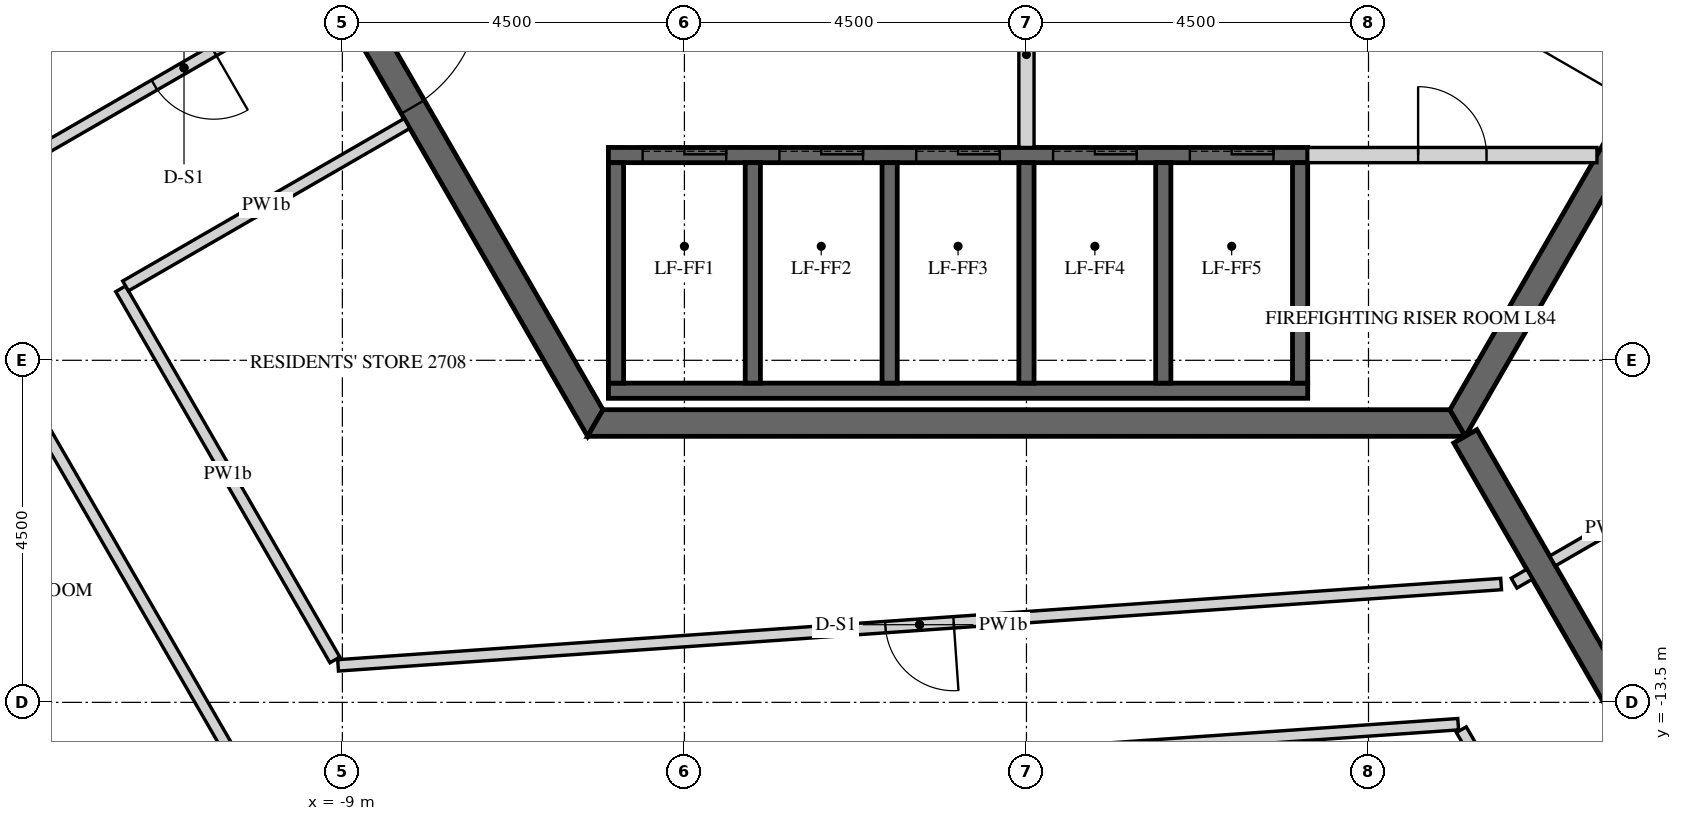
"""IFC4 building model, lengths in metres.
Left out: names, types, materials, properties, quantities, classifications, styles, units other than length and angle.
Written with IfcOpenShell. Run it as: python <this file> out.ifc"""

import sys

from ifc_helpers import new_model, si_unit, direction, frame, frame_2d, origin, place, context, subcontext, project, spatial, polyline, rectangle, outline, extrude, element, fill, save


model = new_model("IFC4")
c1 = context("Model", 3, precision=1e-05, world=origin(), true_north=direction((0.0, 1.0)))
c2 = subcontext(c1, "Body", "Model", "MODEL_VIEW")
j1 = project(units=[si_unit("LENGTHUNIT", "METRE"), si_unit("PLANEANGLEUNIT", "RADIAN")], contexts=[c1])
p1 = place(None, origin())
s1 = spatial("IfcSite", under=j1, at=p1, CompositionType="ELEMENT")
p2 = place(p1, origin())
s2 = spatial("IfcBuilding", under=s1, at=p2, CompositionType="ELEMENT")
p3 = place(p2, frame((0.0, 0.0, 349.5)))
s3 = spatial("IfcBuildingStorey", under=s2, at=p3, CompositionType="ELEMENT", Elevation=349.5)
p4 = place(p3, frame((-11.345, 0.0, 0.0), z_axis=(0.0, 0.0, 1.0), x_axis=(0.499995046907, -0.866028263435, 0.0)))
e1 = element("IfcWall", 1, at=p4, inside=s3, PredefinedType="SHEAR", context=c2, shape_type="SweptSolid", body=[
    extrude(outline(polyline([(-0.101, -0.175), (11.446, -0.175), (11.244, 0.175), (0.101, 0.175), (-0.101, -0.175)])), origin(), (0.0, 0.0, 1.0), 3.75),
])
p5 = place(p4, frame((4.744, 0.0, 0.0)))
e2 = element("IfcOpeningElement", 2, at=p5, cuts=e1, PredefinedType="OPENING", context=c2, shape_type="SweptSolid", body=[
    extrude(rectangle(XDim=1.8, YDim=2.4, at=frame_2d((0.9, 1.2))), frame((0.0, 0.185, 0.0), z_axis=(0.0, -1.0, 0.0), x_axis=(1.0, 0.0, 0.0)), (0.0, 0.0, 1.0), 0.37),
])
p6 = place(p3, frame((-5.673, -9.825, 0.0), z_axis=(0.0, 0.0, 1.0), x_axis=(1.0, 0.0, 0.0)))
e3 = element("IfcWall", 3, at=p6, inside=s3, PredefinedType="SHEAR", context=c2, shape_type="SweptSolid", body=[
    extrude(outline(polyline([(-0.101, -0.175), (11.446, -0.175), (11.244, 0.175), (0.101, 0.175), (-0.101, -0.175)])), origin(), (0.0, 0.0, 1.0), 3.75),
])
p7 = place(p3, frame((5.673, -9.825, 0.0), z_axis=(0.0, 0.0, 1.0), x_axis=(0.499995046907, 0.866028263435, 0.0)))
e4 = element("IfcWall", 4, at=p7, inside=s3, PredefinedType="SHEAR", context=c2, shape_type="SweptSolid", body=[
    extrude(outline(polyline([(-0.101, -0.175), (11.446, -0.175), (11.244, 0.175), (0.101, 0.175), (-0.101, -0.175)])), origin(), (0.0, 0.0, 1.0), 3.75),
])
p8 = place(p7, frame((4.801, 0.0, 0.0)))
e5 = element("IfcOpeningElement", 5, at=p8, cuts=e4, PredefinedType="OPENING", context=c2, shape_type="SweptSolid", body=[
    extrude(rectangle(XDim=1.8, YDim=2.4, at=frame_2d((0.9, 1.2))), frame((0.0, 0.185, 0.0), z_axis=(0.0, -1.0, 0.0), x_axis=(1.0, 0.0, 0.0)), (0.0, 0.0, 1.0), 0.37),
])
p9 = place(p3, frame((5.773, -10.0, 0.0), z_axis=(0.0, 0.0, 1.0), x_axis=(0.500007911273, -0.866020836161, 0.0)))
e6 = element("IfcWall", 6, at=p9, inside=s3, PredefinedType="SHEAR", context=c2, shape_type="SweptSolid", body=[
    extrude(rectangle(XDim=14.51, YDim=0.35, at=frame_2d((7.255, 0.0))), origin(), (0.0, 0.0, 1.0), 3.75),
])
p10 = place(p9, frame((6.355, 0.0, 0.0)))
e7 = element("IfcOpeningElement", 7, at=p10, cuts=e6, PredefinedType="OPENING", context=c2, shape_type="SweptSolid", body=[
    extrude(rectangle(XDim=1.8, YDim=2.4, at=frame_2d((0.9, 1.2))), frame((0.0, 0.185, 0.0), z_axis=(0.0, -1.0, 0.0), x_axis=(1.0, 0.0, 0.0)), (0.0, 0.0, 1.0), 0.37),
])
p11 = place(p3, frame((-5.5, -6.3, -0.5), z_axis=(0.0, 0.0, 1.0), x_axis=(1.0, 0.0, 0.0)))
e8 = element("IfcWall", 8, at=p11, inside=s3, PredefinedType="SHEAR", context=c2, shape_type="SweptSolid", body=[
    extrude(rectangle(XDim=9.2, YDim=0.2, at=frame_2d((4.6, 0.0))), origin(), (0.0, 0.0, 1.0), 4.15),
])
p12 = place(p11, frame((0.45, 0.0, 0.5)))
e9 = element("IfcOpeningElement", 9, at=p12, cuts=e8, PredefinedType="OPENING", context=c2, shape_type="SweptSolid", body=[
    extrude(rectangle(XDim=1.1, YDim=2.1, at=frame_2d((0.55, 1.05))), frame((0.0, 0.11, 0.0), z_axis=(0.0, -1.0, 0.0), x_axis=(1.0, 0.0, 0.0)), (0.0, 0.0, 1.0), 0.22),
])
p13 = place(p11, frame((2.25, 0.0, 0.5)))
e10 = element("IfcOpeningElement", 10, at=p13, cuts=e8, PredefinedType="OPENING", context=c2, shape_type="SweptSolid", body=[
    extrude(rectangle(XDim=1.1, YDim=2.1, at=frame_2d((0.55, 1.05))), frame((0.0, 0.11, 0.0), z_axis=(0.0, -1.0, 0.0), x_axis=(1.0, 0.0, 0.0)), (0.0, 0.0, 1.0), 0.22),
])
p14 = place(p11, frame((4.05, 0.0, 0.5)))
e11 = element("IfcOpeningElement", 11, at=p14, cuts=e8, PredefinedType="OPENING", context=c2, shape_type="SweptSolid", body=[
    extrude(rectangle(XDim=1.1, YDim=2.1, at=frame_2d((0.55, 1.05))), frame((0.0, 0.11, 0.0), z_axis=(0.0, -1.0, 0.0), x_axis=(1.0, 0.0, 0.0)), (0.0, 0.0, 1.0), 0.22),
])
p15 = place(p11, frame((5.85, 0.0, 0.5)))
e12 = element("IfcOpeningElement", 12, at=p15, cuts=e8, PredefinedType="OPENING", context=c2, shape_type="SweptSolid", body=[
    extrude(rectangle(XDim=1.1, YDim=2.1, at=frame_2d((0.55, 1.05))), frame((0.0, 0.11, 0.0), z_axis=(0.0, -1.0, 0.0), x_axis=(1.0, 0.0, 0.0)), (0.0, 0.0, 1.0), 0.22),
])
p16 = place(p11, frame((7.65, 0.0, 0.5)))
e13 = element("IfcOpeningElement", 13, at=p16, cuts=e8, PredefinedType="OPENING", context=c2, shape_type="SweptSolid", body=[
    extrude(rectangle(XDim=1.1, YDim=2.1, at=frame_2d((0.55, 1.05))), frame((0.0, 0.11, 0.0), z_axis=(0.0, -1.0, 0.0), x_axis=(1.0, 0.0, 0.0)), (0.0, 0.0, 1.0), 0.22),
])
p17 = place(p3, frame((-5.5, -9.4, -0.5), z_axis=(0.0, 0.0, 1.0), x_axis=(1.0, 0.0, 0.0)))
e14 = element("IfcWall", 14, at=p17, inside=s3, PredefinedType="SHEAR", context=c2, shape_type="SweptSolid", body=[
    extrude(rectangle(XDim=9.2, YDim=0.2, at=frame_2d((4.6, 0.0))), origin(), (0.0, 0.0, 1.0), 4.15),
])
for number, where, z_axis, x_axis in (
    (15, (-5.4, -9.3, -0.5), (0.0, 0.0, 1.0), (0.0, 1.0, 0.0)),
    (16, (-3.6, -9.3, -0.5), (0.0, 0.0, 1.0), (0.0, 1.0, 0.0)),
    (17, (-1.8, -9.3, -0.5), (0.0, 0.0, 1.0), (0.0, 1.0, 0.0)),
    (18, (0.0, -9.3, -0.5), (0.0, 0.0, 1.0), (0.0, 1.0, 0.0)),
    (19, (1.8, -9.3, -0.5), (0.0, 0.0, 1.0), (0.0, 1.0, 0.0)),
    (20, (3.6, -9.3, -0.5), (0.0, 0.0, 1.0), (0.0, 1.0, 0.0)),
):
    element("IfcWall", number, at=place(p3, frame(where, z_axis=z_axis, x_axis=x_axis)), inside=s3, PredefinedType="SHEAR", context=c2, shape_type="SweptSolid", body=[
        extrude(rectangle(XDim=2.9, YDim=0.2, at=frame_2d((1.45, 0.0))), origin(), (0.0, 0.0, 1.0), 4.15),
    ])
p18 = place(p3, frame((0.0, -6.2, 0.0), z_axis=(0.0, 0.0, 1.0), x_axis=(0.0, 1.0, 0.0)))
e21 = element("IfcWall", 21, at=p18, inside=s3, PredefinedType="PARTITIONING", context=c2, shape_type="SweptSolid", body=[
    extrude(rectangle(XDim=6.1, YDim=0.2, at=frame_2d((3.05, 0.0))), origin(), (0.0, 0.0, 1.0), 3.65),
])
p19 = place(p3, frame((3.7, -6.3, 0.0), z_axis=(0.0, 0.0, 1.0), x_axis=(1.0, 0.0, 0.0)))
e22 = element("IfcWall", 22, at=p19, inside=s3, PredefinedType="PARTITIONING", context=c2, shape_type="SweptSolid", body=[
    extrude(rectangle(XDim=3.806, YDim=0.2, at=frame_2d((1.903, 0.0))), origin(), (0.0, 0.0, 1.0), 3.65),
])
p20 = place(p19, frame((1.453, 0.0, 0.0)))
e23 = element("IfcOpeningElement", 23, at=p20, cuts=e22, PredefinedType="OPENING", context=c2, shape_type="SweptSolid", body=[
    extrude(rectangle(XDim=0.9, YDim=2.1, at=frame_2d((0.45, 1.05))), frame((0.0, 0.11, 0.0), z_axis=(0.0, -1.0, 0.0), x_axis=(1.0, 0.0, 0.0)), (0.0, 0.0, 1.0), 0.22),
])
p21 = place(p3, frame((-17.036, -2.792, 0.0), z_axis=(0.0, 0.0, 1.0), x_axis=(0.500006428338, -0.86602169235, 0.0)))
e24 = element("IfcWall", 24, at=p21, inside=s3, PredefinedType="PARTITIONING", context=c2, shape_type="SweptSolid", body=[
    extrude(rectangle(XDim=13.966, YDim=0.15, at=frame_2d((6.983, 0.0))), origin(), (0.0, 0.0, 1.0), 2.82),
])
p22 = place(p21, frame((3.325, 0.0, 0.0)))
e25 = element("IfcOpeningElement", 25, at=p22, cuts=e24, PredefinedType="OPENING", context=c2, shape_type="SweptSolid", body=[
    extrude(rectangle(XDim=1.0, YDim=2.1, at=frame_2d((0.5, 1.05))), frame((0.0, 0.085, 0.0), z_axis=(0.0, -1.0, 0.0), x_axis=(1.0, 0.0, 0.0)), (0.0, 0.0, 1.0), 0.17),
])
p23 = place(p3, frame((-9.97, -14.882, 0.0), z_axis=(0.0, 0.0, 1.0), x_axis=(0.997564384496, 0.06975169378, 0.0)))
e26 = element("IfcWall", 26, at=p23, inside=s3, PredefinedType="PARTITIONING", context=c2, shape_type="SweptSolid", body=[
    extrude(rectangle(XDim=15.688, YDim=0.15, at=frame_2d((7.844, 0.0))), origin(), (0.0, 0.0, 1.0), 2.82),
])
p24 = place(p3, frame((5.721, -13.86, 0.0), z_axis=(0.0, 0.0, 1.0), x_axis=(0.499970524249, -0.866042420948, 0.0)))
e27 = element("IfcWall", 27, at=p24, inside=s3, PredefinedType="PARTITIONING", context=c2, shape_type="SweptSolid", body=[
    extrude(rectangle(XDim=5.339, YDim=0.15, at=frame_2d((2.669, 0.0))), origin(), (0.0, 0.0, 1.0), 2.82),
])
p25 = place(p3, frame((-9.2, -4.066, 0.0), z_axis=(0.0, 0.0, 1.0), x_axis=(-0.866013608182, -0.500020430026, 0.0)))
e28 = element("IfcWall", 28, at=p25, inside=s3, PredefinedType="PARTITIONING", context=c2, shape_type="SweptSolid", body=[
    extrude(rectangle(XDim=4.35, YDim=0.15, at=frame_2d((2.175, 0.0))), origin(), (0.0, 0.0, 1.0), 2.82),
])
p26 = place(p25, frame((1.725, 0.0, 0.0)))
e29 = element("IfcOpeningElement", 29, at=p26, cuts=e28, PredefinedType="OPENING", context=c2, shape_type="SweptSolid", body=[
    extrude(rectangle(XDim=0.9, YDim=2.1, at=frame_2d((0.45, 1.05))), frame((0.0, 0.085, 0.0), z_axis=(0.0, -1.0, 0.0), x_axis=(1.0, 0.0, 0.0)), (0.0, 0.0, 1.0), 0.17),
])
p27 = place(p3, frame((6.619, -11.814, 0.0), z_axis=(0.0, 0.0, 1.0), x_axis=(-0.865544827262, -0.500831460673, 0.0)))
e30 = element("IfcWall", 30, at=p27, inside=s3, PredefinedType="PARTITIONING", context=c2, shape_type="SweptSolid", body=[
    extrude(rectangle(XDim=0.235, YDim=0.15, at=frame_2d((0.117, 0.0))), origin(), (0.0, 0.0, 1.0), 2.82),
])
p28 = place(p3, frame((6.245, -11.944, 0.0), z_axis=(0.0, 0.0, 1.0), x_axis=(-0.997564707029, -0.069747080866, 0.0)))
e31 = element("IfcWall", 31, at=p28, inside=s3, PredefinedType="PARTITIONING", context=c2, shape_type="SweptSolid", body=[
    extrude(rectangle(XDim=15.339, YDim=0.15, at=frame_2d((7.669, 0.0))), origin(), (0.0, 0.0, 1.0), 2.82),
])
p29 = place(p28, frame((7.219, 0.0, 0.0)))
e32 = element("IfcOpeningElement", 32, at=p29, cuts=e31, PredefinedType="OPENING", context=c2, shape_type="SweptSolid", body=[
    extrude(rectangle(XDim=0.9, YDim=2.1, at=frame_2d((0.45, 1.05))), frame((0.0, 0.085, 0.0), z_axis=(0.0, -1.0, 0.0), x_axis=(1.0, 0.0, 0.0)), (0.0, 0.0, 1.0), 0.17),
])
p30 = place(p3, frame((-9.098, -12.941, 0.0), z_axis=(0.0, 0.0, 1.0), x_axis=(-0.500009875128, 0.866019702301, 0.0)))
e33 = element("IfcWall", 33, at=p30, inside=s3, PredefinedType="PARTITIONING", context=c2, shape_type="SweptSolid", body=[
    extrude(rectangle(XDim=5.637, YDim=0.15, at=frame_2d((2.819, 0.0))), origin(), (0.0, 0.0, 1.0), 2.82),
])
p31 = place(p3, frame((-11.852, -8.022, 0.0), z_axis=(0.0, 0.0, 1.0), x_axis=(0.866038183914, 0.499977863513, 0.0)))
e34 = element("IfcWall", 34, at=p31, inside=s3, PredefinedType="PARTITIONING", context=c2, shape_type="SweptSolid", body=[
    extrude(rectangle(XDim=4.275, YDim=0.15, at=frame_2d((2.138, 0.0))), origin(), (0.0, 0.0, 1.0), 2.82),
])
p32 = place(p3, frame((8.416, -10.777, 0.0), z_axis=(0.0, 0.0, 1.0), x_axis=(-0.866074815912, -0.499914405916, 0.0)))
e35 = element("IfcWall", 35, at=p32, inside=s3, PredefinedType="PARTITIONING", context=c2, shape_type="SweptSolid", body=[
    extrude(rectangle(XDim=1.725, YDim=0.15, at=frame_2d((0.862, 0.0))), origin(), (0.0, 0.0, 1.0), 2.82),
])
p33 = place(p5, origin())
e36 = element("IfcDoor", 36, at=p33, inside=s3, OperationType="DOUBLE_DOOR_SINGLE_SWING", PredefinedType="DOOR", context=c2, shape_type="SweptSolid", body=[
    extrude(rectangle(XDim=1.8, YDim=2.4, at=frame_2d((0.9, 1.2))), frame((0.0, 0.025, 0.0), z_axis=(0.0, -1.0, 0.0), x_axis=(1.0, 0.0, 0.0)), (0.0, 0.0, 1.0), 0.05),
])
fill(e2, e36)
p34 = place(p20, origin())
e37 = element("IfcDoor", 37, at=p34, inside=s3, OperationType="SINGLE_SWING_LEFT", PredefinedType="DOOR", context=c2, shape_type="SweptSolid", body=[
    extrude(rectangle(XDim=0.9, YDim=2.1, at=frame_2d((0.45, 1.05))), frame((0.0, 0.025, 0.0), z_axis=(0.0, -1.0, 0.0), x_axis=(1.0, 0.0, 0.0)), (0.0, 0.0, 1.0), 0.05),
])
fill(e23, e37)
p35 = place(p12, origin())
e38 = element("IfcDoor", 38, at=p35, inside=s3, OperationType="SLIDING_TO_LEFT", PredefinedType="DOOR", context=c2, shape_type="SweptSolid", body=[
    extrude(rectangle(XDim=1.1, YDim=2.1, at=frame_2d((0.55, 1.05))), frame((0.0, 0.025, 0.0), z_axis=(0.0, -1.0, 0.0), x_axis=(1.0, 0.0, 0.0)), (0.0, 0.0, 1.0), 0.05),
])
fill(e9, e38)
p36 = place(p13, origin())
e39 = element("IfcDoor", 39, at=p36, inside=s3, OperationType="SLIDING_TO_LEFT", PredefinedType="DOOR", context=c2, shape_type="SweptSolid", body=[
    extrude(rectangle(XDim=1.1, YDim=2.1, at=frame_2d((0.55, 1.05))), frame((0.0, 0.025, 0.0), z_axis=(0.0, -1.0, 0.0), x_axis=(1.0, 0.0, 0.0)), (0.0, 0.0, 1.0), 0.05),
])
fill(e10, e39)
p37 = place(p14, origin())
e40 = element("IfcDoor", 40, at=p37, inside=s3, OperationType="SLIDING_TO_LEFT", PredefinedType="DOOR", context=c2, shape_type="SweptSolid", body=[
    extrude(rectangle(XDim=1.1, YDim=2.1, at=frame_2d((0.55, 1.05))), frame((0.0, 0.025, 0.0), z_axis=(0.0, -1.0, 0.0), x_axis=(1.0, 0.0, 0.0)), (0.0, 0.0, 1.0), 0.05),
])
fill(e11, e40)
p38 = place(p15, origin())
e41 = element("IfcDoor", 41, at=p38, inside=s3, OperationType="SLIDING_TO_LEFT", PredefinedType="DOOR", context=c2, shape_type="SweptSolid", body=[
    extrude(rectangle(XDim=1.1, YDim=2.1, at=frame_2d((0.55, 1.05))), frame((0.0, 0.025, 0.0), z_axis=(0.0, -1.0, 0.0), x_axis=(1.0, 0.0, 0.0)), (0.0, 0.0, 1.0), 0.05),
])
fill(e12, e41)
p39 = place(p16, origin())
e42 = element("IfcDoor", 42, at=p39, inside=s3, OperationType="SLIDING_TO_LEFT", PredefinedType="DOOR", context=c2, shape_type="SweptSolid", body=[
    extrude(rectangle(XDim=1.1, YDim=2.1, at=frame_2d((0.55, 1.05))), frame((0.0, 0.025, 0.0), z_axis=(0.0, -1.0, 0.0), x_axis=(1.0, 0.0, 0.0)), (0.0, 0.0, 1.0), 0.05),
])
fill(e13, e42)
p40 = place(p26, origin())
e43 = element("IfcDoor", 43, at=p40, inside=s3, OperationType="SINGLE_SWING_LEFT", PredefinedType="DOOR", context=c2, shape_type="SweptSolid", body=[
    extrude(rectangle(XDim=0.9, YDim=2.1, at=frame_2d((0.45, 1.05))), frame((0.0, 0.025, 0.0), z_axis=(0.0, -1.0, 0.0), x_axis=(1.0, 0.0, 0.0)), (0.0, 0.0, 1.0), 0.05),
])
fill(e29, e43)
p41 = place(p29, origin())
e44 = element("IfcDoor", 44, at=p41, inside=s3, OperationType="SINGLE_SWING_RIGHT", PredefinedType="DOOR", context=c2, shape_type="SweptSolid", body=[
    extrude(rectangle(XDim=0.9, YDim=2.1, at=frame_2d((0.45, 1.05))), frame((0.0, 0.025, 0.0), z_axis=(0.0, -1.0, 0.0), x_axis=(1.0, 0.0, 0.0)), (0.0, 0.0, 1.0), 0.05),
])
fill(e32, e44)
save(model, sys.argv[1])
